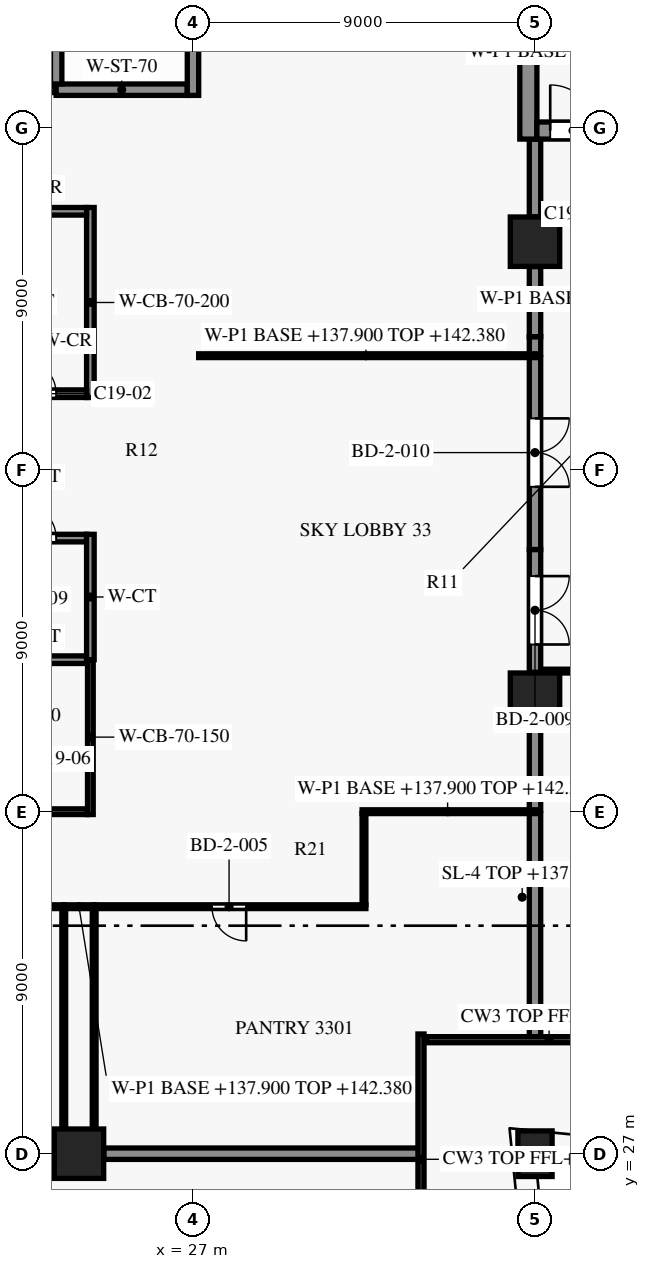
"""IFC4 building model, lengths in metres.
Left out: names, types, materials, properties, quantities, classifications, styles, units other than length and angle.
Written with IfcOpenShell. Run it as: python <this file> out.ifc"""

import sys

from ifc_helpers import new_model, si_unit, direction, frame, frame_2d, origin, origin_2d, place, context, subcontext, project, spatial, rectangle, extrude, element, fill, save


model = new_model("IFC4")
c1 = context("Model", 3, precision=1e-05, world=origin(), true_north=direction((0.0, 1.0)))
c2 = subcontext(c1, "Body", "Model", "MODEL_VIEW")
j1 = project(units=[si_unit("LENGTHUNIT", "METRE"), si_unit("PLANEANGLEUNIT", "RADIAN")], contexts=[c1])
p1 = place(None, origin())
s1 = spatial("IfcSite", under=j1, at=p1, CompositionType="ELEMENT")
p2 = place(p1, origin())
s2 = spatial("IfcBuilding", under=s1, at=p2, CompositionType="ELEMENT")
p3 = place(p2, frame((0.0, 0.0, 137.9)))
s3 = spatial("IfcBuildingStorey", under=s2, at=p3, CompositionType="ELEMENT", Elevation=137.9)
p4 = place(p3, frame((36.0, 27.0, 0.0), z_axis=(0.0, 0.0, 1.0), x_axis=(-0.0995038382, 0.995037178292, 0.0)))
e1 = element("IfcColumn", 1, at=p4, inside=s3, PredefinedType="COLUMN", context=c2, shape_type="SweptSolid", body=[
    extrude(rectangle(XDim=0.9, YDim=1.2, at=origin_2d()), origin(), (0.0, 0.0, 1.0), 5.5),
])
for number, where, z_axis, x_axis in (
    (2, (24.0, 27.0, 0.0), (0.0, 0.0, 1.0), (1.0, 0.0, 0.0)),
    (3, (36.0, 39.0, 0.0), (0.0, 0.0, 1.0), (1.0, 0.0, 0.0)),
    (4, (36.0, 51.0, 0.0), (0.0, 0.0, 1.0), (1.0, 0.0, 0.0)),
):
    element("IfcColumn", number, at=place(p3, frame(where, z_axis=z_axis, x_axis=x_axis)), inside=s3, PredefinedType="COLUMN", context=c2, shape_type="SweptSolid", body=[
        extrude(rectangle(XDim=1.3, YDim=1.3, at=origin_2d()), origin(), (0.0, 0.0, 1.0), 5.5),
    ])
p5 = place(p3, frame((12.4, 36.0, 0.0), z_axis=(0.0, 0.0, 1.0), x_axis=(1.0, 0.0, 0.0)))
e5 = element("IfcWall", 5, at=p5, inside=s3, PredefinedType="SHEAR", context=c2, shape_type="SweptSolid", body=[
    extrude(rectangle(XDim=11.825, YDim=0.15, at=frame_2d((5.913, 0.0))), origin(), (0.0, 0.0, 1.0), 5.2),
])
p6 = place(p5, frame((0.825, 0.0, 0.0)))
e6 = element("IfcOpeningElement", 6, at=p6, cuts=e5, PredefinedType="OPENING", context=c2, shape_type="SweptSolid", body=[
    extrude(rectangle(XDim=0.95, YDim=2.1, at=frame_2d((0.475, 1.05))), frame((0.0, 0.085, 0.0), z_axis=(0.0, -1.0, 0.0), x_axis=(1.0, 0.0, 0.0)), (0.0, 0.0, 1.0), 0.17),
])
p7 = place(p5, frame((3.65, 0.0, 0.0)))
e7 = element("IfcOpeningElement", 7, at=p7, cuts=e5, PredefinedType="OPENING", context=c2, shape_type="SweptSolid", body=[
    extrude(rectangle(XDim=1.0, YDim=2.1, at=frame_2d((0.5, 1.05))), frame((0.0, 0.085, 0.0), z_axis=(0.0, -1.0, 0.0), x_axis=(1.0, 0.0, 0.0)), (0.0, 0.0, 1.0), 0.17),
])
p8 = place(p5, frame((6.8, 0.0, 0.0)))
e8 = element("IfcOpeningElement", 8, at=p8, cuts=e5, PredefinedType="OPENING", context=c2, shape_type="SweptSolid", body=[
    extrude(rectangle(XDim=0.9, YDim=2.1, at=frame_2d((0.45, 1.05))), frame((0.0, 0.085, 0.0), z_axis=(0.0, -1.0, 0.0), x_axis=(1.0, 0.0, 0.0)), (0.0, 0.0, 1.0), 0.17),
])
p9 = place(p5, frame((9.9, 0.0, 0.0)))
e9 = element("IfcOpeningElement", 9, at=p9, cuts=e5, PredefinedType="OPENING", context=c2, shape_type="SweptSolid", body=[
    extrude(rectangle(XDim=0.9, YDim=2.1, at=frame_2d((0.45, 1.05))), frame((0.0, 0.085, 0.0), z_axis=(0.0, -1.0, 0.0), x_axis=(1.0, 0.0, 0.0)), (0.0, 0.0, 1.0), 0.17),
])
p10 = place(p3, frame((21.6, 40.0, 0.0), z_axis=(0.0, 0.0, 1.0), x_axis=(1.0, 0.0, 0.0)))
e10 = element("IfcWall", 10, at=p10, inside=s3, PredefinedType="PARTITIONING", context=c2, shape_type="SweptSolid", body=[
    extrude(rectangle(XDim=2.6, YDim=0.2, at=frame_2d((1.3, 0.0))), origin(), (0.0, 0.0, 1.0), 5.2),
])
p11 = place(p3, frame((21.6, 43.2, 0.0), z_axis=(0.0, 0.0, 1.0), x_axis=(1.0, 0.0, 0.0)))
e11 = element("IfcWall", 11, at=p11, inside=s3, PredefinedType="PARTITIONING", context=c2, shape_type="SweptSolid", body=[
    extrude(rectangle(XDim=2.6, YDim=0.2, at=frame_2d((1.3, 0.0))), origin(), (0.0, 0.0, 1.0), 5.2),
])
p12 = place(p11, frame((0.9, 0.0, 0.0)))
e12 = element("IfcOpeningElement", 12, at=p12, cuts=e11, PredefinedType="OPENING", context=c2, shape_type="SweptSolid", body=[
    extrude(rectangle(XDim=0.9, YDim=2.1, at=frame_2d((0.45, 1.05))), frame((0.0, 0.11, 0.0), z_axis=(0.0, -1.0, 0.0), x_axis=(1.0, 0.0, 0.0)), (0.0, 0.0, 1.0), 0.22),
])
p13 = place(p3, frame((21.6, 47.0, 0.0), z_axis=(0.0, 0.0, 1.0), x_axis=(1.0, 0.0, 0.0)))
e13 = element("IfcWall", 13, at=p13, inside=s3, PredefinedType="PARTITIONING", context=c2, shape_type="SweptSolid", body=[
    extrude(rectangle(XDim=2.6, YDim=0.2, at=frame_2d((1.3, 0.0))), origin(), (0.0, 0.0, 1.0), 5.2),
])
p14 = place(p13, frame((0.9, 0.0, 0.0)))
e14 = element("IfcOpeningElement", 14, at=p14, cuts=e13, PredefinedType="OPENING", context=c2, shape_type="SweptSolid", body=[
    extrude(rectangle(XDim=0.9, YDim=2.1, at=frame_2d((0.45, 1.05))), frame((0.0, 0.11, 0.0), z_axis=(0.0, -1.0, 0.0), x_axis=(1.0, 0.0, 0.0)), (0.0, 0.0, 1.0), 0.22),
])
p15 = place(p3, frame((21.6, 51.8, 0.0), z_axis=(0.0, 0.0, 1.0), x_axis=(1.0, 0.0, 0.0)))
e15 = element("IfcWall", 15, at=p15, inside=s3, PredefinedType="PARTITIONING", context=c2, shape_type="SweptSolid", body=[
    extrude(rectangle(XDim=2.6, YDim=0.2, at=frame_2d((1.3, 0.0))), origin(), (0.0, 0.0, 1.0), 5.2),
])
p16 = place(p3, frame((36.05, 53.925, 0.0), z_axis=(0.0, 0.0, 1.0), x_axis=(1.0, 0.0, 0.0)))
e16 = element("IfcWall", 16, at=p16, inside=s3, PredefinedType="SHEAR", context=c2, shape_type="SweptSolid", body=[
    extrude(rectangle(XDim=7.7, YDim=0.45, at=frame_2d((3.85, 0.0))), origin(), (0.0, 0.0, 1.0), 5.2),
])
p17 = place(p16, frame((0.35, 0.0, 0.0)))
e17 = element("IfcOpeningElement", 17, at=p17, cuts=e16, PredefinedType="OPENING", context=c2, shape_type="SweptSolid", body=[
    extrude(rectangle(XDim=1.2, YDim=2.2, at=frame_2d((0.6, 1.1))), frame((0.0, 0.235, 0.0), z_axis=(0.0, -1.0, 0.0), x_axis=(1.0, 0.0, 0.0)), (0.0, 0.0, 1.0), 0.47),
])
p18 = place(p3, frame((13.5, 55.0, 0.0), z_axis=(0.0, 0.0, 1.0), x_axis=(1.0, 0.0, 0.0)))
e18 = element("IfcWall", 18, at=p18, inside=s3, PredefinedType="PARTITIONING", context=c2, shape_type="SweptSolid", body=[
    extrude(rectangle(XDim=9.9, YDim=0.15, at=frame_2d((4.95, 0.0))), origin(), (0.0, 0.0, 1.0), 5.2),
])
p19 = place(p18, frame((4.45, 0.0, 0.0)))
e19 = element("IfcOpeningElement", 19, at=p19, cuts=e18, PredefinedType="OPENING", context=c2, shape_type="SweptSolid", body=[
    extrude(rectangle(XDim=1.0, YDim=2.1, at=frame_2d((0.5, 1.05))), frame((0.0, 0.085, 0.0), z_axis=(0.0, -1.0, 0.0), x_axis=(1.0, 0.0, 0.0)), (0.0, 0.0, 1.0), 0.17),
])
p20 = place(p3, frame((23.4, 55.0, 0.0), z_axis=(0.0, 0.0, 1.0), x_axis=(1.0, 0.0, 0.0)))
e20 = element("IfcWall", 20, at=p20, inside=s3, PredefinedType="SHEAR", context=c2, shape_type="SweptSolid", body=[
    extrude(rectangle(XDim=3.45, YDim=0.3, at=frame_2d((1.725, 0.0))), origin(), (0.0, 0.0, 1.0), 5.2),
])
p21 = place(p3, frame((23.4, 55.15, 0.0), z_axis=(0.0, 0.0, 1.0), x_axis=(0.0, 1.0, 0.0)))
e21 = element("IfcWall", 21, at=p21, inside=s3, PredefinedType="SHEAR", context=c2, shape_type="SweptSolid", body=[
    extrude(rectangle(XDim=8.0, YDim=0.3, at=frame_2d((4.0, 0.0))), origin(), (0.0, 0.0, 1.0), 5.2),
])
p22 = place(p3, frame((24.3, 35.925, 0.0), z_axis=(0.0, 0.0, 1.0), x_axis=(0.0, 1.0, 0.0)))
e22 = element("IfcWall", 22, at=p22, inside=s3, PredefinedType="SHEAR", context=c2, shape_type="SweptSolid", body=[
    extrude(rectangle(XDim=4.075, YDim=0.15, at=frame_2d((2.038, 0.0))), origin(), (0.0, 0.0, 1.0), 5.2),
])
p23 = place(p3, frame((24.3, 40.0, 0.0), z_axis=(0.0, 0.0, 1.0), x_axis=(0.0, 1.0, 0.0)))
e23 = element("IfcWall", 23, at=p23, inside=s3, PredefinedType="PARTITIONING", context=c2, shape_type="SweptSolid", body=[
    extrude(rectangle(XDim=3.3, YDim=0.2, at=frame_2d((1.65, 0.0))), origin(), (0.0, 0.0, 1.0), 5.2),
])
p24 = place(p3, frame((24.3, 46.9, 0.0), z_axis=(0.0, 0.0, 1.0), x_axis=(0.0, 1.0, 0.0)))
e24 = element("IfcWall", 24, at=p24, inside=s3, PredefinedType="SHEAR", context=c2, shape_type="SweptSolid", body=[
    extrude(rectangle(XDim=5.0, YDim=0.2, at=frame_2d((2.5, 0.0))), origin(), (0.0, 0.0, 1.0), 5.2),
])
p25 = place(p3, frame((27.0, 54.85, 0.0), z_axis=(0.0, 0.0, 1.0), x_axis=(0.0, 1.0, 0.0)))
e25 = element("IfcWall", 25, at=p25, inside=s3, PredefinedType="SHEAR", context=c2, shape_type="SweptSolid", body=[
    extrude(rectangle(XDim=8.45, YDim=0.3, at=frame_2d((4.225, 0.0))), origin(), (0.0, 0.0, 1.0), 5.2),
])
p26 = place(p25, frame((6.55, 0.0, 0.0)))
e26 = element("IfcOpeningElement", 26, at=p26, cuts=e25, PredefinedType="OPENING", context=c2, shape_type="SweptSolid", body=[
    extrude(rectangle(XDim=1.2, YDim=2.2, at=frame_2d((0.6, 1.1))), frame((0.0, 0.16, 0.0), z_axis=(0.0, -1.0, 0.0), x_axis=(1.0, 0.0, 0.0)), (0.0, 0.0, 1.0), 0.32),
])
p27 = place(p3, frame((35.825, 53.7, 0.0), z_axis=(0.0, 0.0, 1.0), x_axis=(0.0, 1.0, 0.0)))
e27 = element("IfcWall", 27, at=p27, inside=s3, PredefinedType="SHEAR", context=c2, shape_type="SweptSolid", body=[
    extrude(rectangle(XDim=4.2, YDim=0.45, at=frame_2d((2.1, 0.0))), origin(), (0.0, 0.0, 1.0), 5.2),
])
p28 = place(p3, frame((23.345, 27.0, 0.0), z_axis=(0.0, 0.0, 1.0), x_axis=(-1.0, 0.0, 0.0)))
e28 = element("IfcWall", 28, at=p28, inside=s3, PredefinedType="PARTITIONING", context=c2, shape_type="SweptSolid", body=[
    extrude(rectangle(XDim=2.945, YDim=0.3, at=frame_2d((1.473, 0.0))), origin(), (0.0, 0.0, 1.0), 4.48),
])
p29 = place(p3, frame((33.05, 27.0, 0.0), z_axis=(0.0, 0.0, 1.0), x_axis=(-1.0, 0.0, 0.0)))
e29 = element("IfcWall", 29, at=p29, inside=s3, PredefinedType="PARTITIONING", context=c2, shape_type="SweptSolid", body=[
    extrude(rectangle(XDim=8.395, YDim=0.3, at=frame_2d((4.198, 0.0))), origin(), (0.0, 0.0, 1.0), 4.48),
])
for number, where, z_axis, x_axis in (
    (30, (24.4, 27.655, 0.0), (0.0, 0.0, 1.0), (0.0, 1.0, 0.0)),
    (31, (23.6, 33.45, 0.0), (0.0, 0.0, 1.0), (0.0, -1.0, 0.0)),
):
    element("IfcWall", number, at=place(p3, frame(where, z_axis=z_axis, x_axis=x_axis)), inside=s3, PredefinedType="PARTITIONING", context=c2, shape_type="SweptSolid", body=[
        extrude(rectangle(XDim=5.795, YDim=0.1, at=frame_2d((2.897, 0.0))), origin(), (0.0, 0.0, 1.0), 5.18),
    ])
p30 = place(p3, frame((23.6, 33.5, 0.0), z_axis=(0.0, 0.0, 1.0), x_axis=(-1.0, 0.0, 0.0)))
e32 = element("IfcWall", 32, at=p30, inside=s3, PredefinedType="PARTITIONING", context=c2, shape_type="SweptSolid", body=[
    extrude(rectangle(XDim=3.25, YDim=0.1, at=frame_2d((1.625, 0.0))), origin(), (0.0, 0.0, 1.0), 5.18),
])
p31 = place(p3, frame((24.4, 33.5, 0.0), z_axis=(0.0, 0.0, 1.0), x_axis=(-1.0, 0.0, 0.0)))
e33 = element("IfcWall", 33, at=p31, inside=s3, PredefinedType="PARTITIONING", context=c2, shape_type="SweptSolid", body=[
    extrude(rectangle(XDim=0.8, YDim=0.1, at=frame_2d((0.4, 0.0))), origin(), (0.0, 0.0, 1.0), 4.48),
])
p32 = place(p3, frame((31.55, 33.5, 0.0), z_axis=(0.0, 0.0, 1.0), x_axis=(-1.0, 0.0, 0.0)))
e34 = element("IfcWall", 34, at=p32, inside=s3, PredefinedType="PARTITIONING", context=c2, shape_type="SweptSolid", body=[
    extrude(rectangle(XDim=7.15, YDim=0.1, at=frame_2d((3.575, 0.0))), origin(), (0.0, 0.0, 1.0), 5.18),
])
p33 = place(p32, frame((3.15, 0.0, 0.0)))
e35 = element("IfcOpeningElement", 35, at=p33, cuts=e34, PredefinedType="OPENING", context=c2, shape_type="SweptSolid", body=[
    extrude(rectangle(XDim=0.9, YDim=2.1, at=frame_2d((0.45, 1.05))), frame((0.0, 0.06, 0.0), z_axis=(0.0, -1.0, 0.0), x_axis=(1.0, 0.0, 0.0)), (0.0, 0.0, 1.0), 0.12),
])
p34 = place(p3, frame((31.5, 35.95, 0.0), z_axis=(0.0, 0.0, 1.0), x_axis=(0.0, -1.0, 0.0)))
e36 = element("IfcWall", 36, at=p34, inside=s3, PredefinedType="PARTITIONING", context=c2, shape_type="SweptSolid", body=[
    extrude(rectangle(XDim=2.4, YDim=0.1, at=frame_2d((1.2, 0.0))), origin(), (0.0, 0.0, 1.0), 5.18),
])
p35 = place(p3, frame((36.0, 35.95, 0.0), z_axis=(0.0, 0.0, 1.0), x_axis=(0.0, -1.0, 0.0)))
e37 = element("IfcWall", 37, at=p35, inside=s3, PredefinedType="PARTITIONING", context=c2, shape_type="SweptSolid", body=[
    extrude(rectangle(XDim=5.9, YDim=0.3, at=frame_2d((2.95, 0.0))), origin(), (0.0, 0.0, 1.0), 4.48),
])
p36 = place(p3, frame((35.95, 36.0, 0.0), z_axis=(0.0, 0.0, 1.0), x_axis=(-1.0, 0.0, 0.0)))
e38 = element("IfcWall", 38, at=p36, inside=s3, PredefinedType="PARTITIONING", context=c2, shape_type="SweptSolid", body=[
    extrude(rectangle(XDim=4.5, YDim=0.1, at=frame_2d((2.25, 0.0))), origin(), (0.0, 0.0, 1.0), 4.48),
])
p37 = place(p3, frame((36.0, 38.345, 0.0), z_axis=(0.0, 0.0, 1.0), x_axis=(0.0, -1.0, 0.0)))
e39 = element("IfcWall", 39, at=p37, inside=s3, PredefinedType="PARTITIONING", context=c2, shape_type="SweptSolid", body=[
    extrude(rectangle(XDim=2.295, YDim=0.3, at=frame_2d((1.147, 0.0))), origin(), (0.0, 0.0, 1.0), 4.48),
])
p38 = place(p3, frame((66.05, 39.7, 0.0), z_axis=(0.0, 0.0, 1.0), x_axis=(-1.0, 0.0, 0.0)))
e40 = element("IfcWall", 40, at=p38, inside=s3, PredefinedType="PARTITIONING", context=c2, shape_type="SweptSolid", body=[
    extrude(rectangle(XDim=30.0, YDim=0.1, at=frame_2d((15.0, 0.0))), origin(), (0.0, 0.0, 1.0), 4.48),
])
p39 = place(p3, frame((36.0, 42.9, 0.0), z_axis=(0.0, 0.0, 1.0), x_axis=(0.0, -1.0, 0.0)))
e41 = element("IfcWall", 41, at=p39, inside=s3, PredefinedType="PARTITIONING", context=c2, shape_type="SweptSolid", body=[
    extrude(rectangle(XDim=3.23, YDim=0.3, at=frame_2d((1.615, 0.0))), origin(), (0.0, 0.0, 1.0), 4.48),
])
p40 = place(p39, frame((0.7, 0.0, 0.0)))
e42 = element("IfcOpeningElement", 42, at=p40, cuts=e41, PredefinedType="OPENING", context=c2, shape_type="SweptSolid", body=[
    extrude(rectangle(XDim=1.8, YDim=2.1, at=frame_2d((0.9, 1.05))), frame((0.0, 0.16, 0.0), z_axis=(0.0, -1.0, 0.0), x_axis=(1.0, 0.0, 0.0)), (0.0, 0.0, 1.0), 0.32),
])
p41 = place(p3, frame((36.0, 47.95, 0.0), z_axis=(0.0, 0.0, 1.0), x_axis=(0.0, -1.0, 0.0)))
e43 = element("IfcWall", 43, at=p41, inside=s3, PredefinedType="PARTITIONING", context=c2, shape_type="SweptSolid", body=[
    extrude(rectangle(XDim=5.05, YDim=0.3, at=frame_2d((2.525, 0.0))), origin(), (0.0, 0.0, 1.0), 4.48),
])
p42 = place(p41, frame((1.6, 0.0, 0.0)))
e44 = element("IfcOpeningElement", 44, at=p42, cuts=e43, PredefinedType="OPENING", context=c2, shape_type="SweptSolid", body=[
    extrude(rectangle(XDim=1.8, YDim=2.1, at=frame_2d((0.9, 1.05))), frame((0.0, 0.16, 0.0), z_axis=(0.0, -1.0, 0.0), x_axis=(1.0, 0.0, 0.0)), (0.0, 0.0, 1.0), 0.32),
])
p43 = place(p3, frame((27.15, 48.0, 0.0), z_axis=(0.0, 0.0, 1.0), x_axis=(1.0, 0.0, 0.0)))
e45 = element("IfcWall", 45, at=p43, inside=s3, PredefinedType="PARTITIONING", context=c2, shape_type="SweptSolid", body=[
    extrude(rectangle(XDim=8.8, YDim=0.1, at=frame_2d((4.4, 0.0))), origin(), (0.0, 0.0, 1.0), 4.48),
])
p44 = place(p3, frame((36.0, 48.05, 0.0), z_axis=(0.0, 0.0, 1.0), x_axis=(0.0, 1.0, 0.0)))
e46 = element("IfcWall", 46, at=p44, inside=s3, PredefinedType="PARTITIONING", context=c2, shape_type="SweptSolid", body=[
    extrude(rectangle(XDim=0.45, YDim=0.3, at=frame_2d((0.225, 0.0))), origin(), (0.0, 0.0, 1.0), 4.48),
])
p45 = place(p3, frame((36.0, 48.5, 0.0), z_axis=(0.0, 0.0, 1.0), x_axis=(0.0, 1.0, 0.0)))
e47 = element("IfcWall", 47, at=p45, inside=s3, PredefinedType="PARTITIONING", context=c2, shape_type="SweptSolid", body=[
    extrude(rectangle(XDim=1.845, YDim=0.3, at=frame_2d((0.922, 0.0))), origin(), (0.0, 0.0, 1.0), 4.48),
])
p46 = place(p3, frame((36.0, 51.655, 0.0), z_axis=(0.0, 0.0, 1.0), x_axis=(0.0, 1.0, 0.0)))
e48 = element("IfcWall", 48, at=p46, inside=s3, PredefinedType="PARTITIONING", context=c2, shape_type="SweptSolid", body=[
    extrude(rectangle(XDim=2.045, YDim=0.3, at=frame_2d((1.022, 0.0))), origin(), (0.0, 0.0, 1.0), 4.48),
])
p47 = place(p14, origin())
e49 = element("IfcDoor", 49, at=p47, inside=s3, OperationType="SINGLE_SWING_LEFT", PredefinedType="DOOR", context=c2, shape_type="SweptSolid", body=[
    extrude(rectangle(XDim=0.9, YDim=2.1, at=frame_2d((0.45, 1.05))), frame((0.0, 0.025, 0.0), z_axis=(0.0, -1.0, 0.0), x_axis=(1.0, 0.0, 0.0)), (0.0, 0.0, 1.0), 0.05),
])
fill(e14, e49)
p48 = place(p12, origin())
e50 = element("IfcDoor", 50, at=p48, inside=s3, OperationType="SINGLE_SWING_RIGHT", PredefinedType="DOOR", context=c2, shape_type="SweptSolid", body=[
    extrude(rectangle(XDim=0.9, YDim=2.1, at=frame_2d((0.45, 1.05))), frame((0.0, 0.025, 0.0), z_axis=(0.0, -1.0, 0.0), x_axis=(1.0, 0.0, 0.0)), (0.0, 0.0, 1.0), 0.05),
])
fill(e12, e50)
p49 = place(p17, origin())
e51 = element("IfcDoor", 51, at=p49, inside=s3, OperationType="SINGLE_SWING_LEFT", PredefinedType="DOOR", context=c2, shape_type="SweptSolid", body=[
    extrude(rectangle(XDim=1.2, YDim=2.2, at=frame_2d((0.6, 1.1))), frame((0.0, 0.025, 0.0), z_axis=(0.0, -1.0, 0.0), x_axis=(1.0, 0.0, 0.0)), (0.0, 0.0, 1.0), 0.05),
])
fill(e17, e51)
p50 = place(p33, origin())
e52 = element("IfcDoor", 52, at=p50, inside=s3, OperationType="SINGLE_SWING_RIGHT", PredefinedType="DOOR", context=c2, shape_type="SweptSolid", body=[
    extrude(rectangle(XDim=0.9, YDim=2.1, at=frame_2d((0.45, 1.05))), frame((0.0, 0.025, 0.0), z_axis=(0.0, -1.0, 0.0), x_axis=(1.0, 0.0, 0.0)), (0.0, 0.0, 1.0), 0.05),
])
fill(e35, e52)
p51 = place(p40, origin())
e53 = element("IfcDoor", 53, at=p51, inside=s3, OperationType="DOUBLE_DOOR_SINGLE_SWING", PredefinedType="DOOR", context=c2, shape_type="SweptSolid", body=[
    extrude(rectangle(XDim=1.8, YDim=2.1, at=frame_2d((0.9, 1.05))), frame((0.0, 0.025, 0.0), z_axis=(0.0, -1.0, 0.0), x_axis=(1.0, 0.0, 0.0)), (0.0, 0.0, 1.0), 0.05),
])
fill(e42, e53)
p52 = place(p42, origin())
e54 = element("IfcDoor", 54, at=p52, inside=s3, OperationType="DOUBLE_DOOR_SINGLE_SWING", PredefinedType="DOOR", context=c2, shape_type="SweptSolid", body=[
    extrude(rectangle(XDim=1.8, YDim=2.1, at=frame_2d((0.9, 1.05))), frame((0.0, 0.025, 0.0), z_axis=(0.0, -1.0, 0.0), x_axis=(1.0, 0.0, 0.0)), (0.0, 0.0, 1.0), 0.05),
])
fill(e44, e54)
save(model, sys.argv[1])
